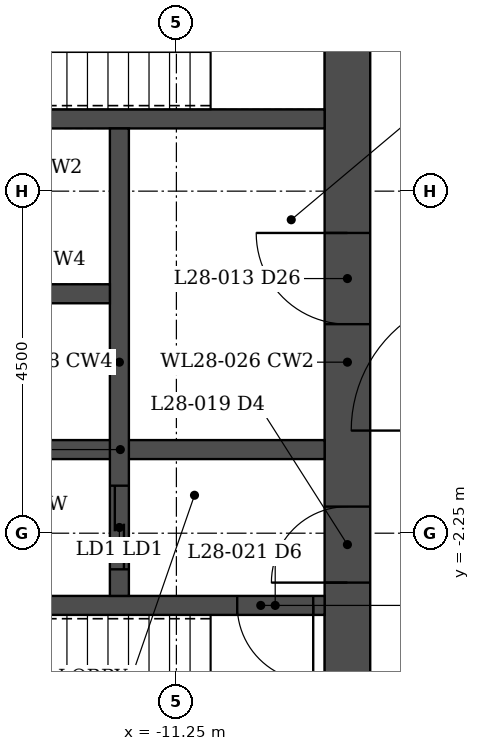
"""IFC4 building model, lengths in metres.
Left out: names, types, materials, properties, quantities, classifications, styles, units other than length and angle.
Written with IfcOpenShell. Run it as: python <this file> out.ifc"""

import sys

from ifc_helpers import new_model, si_unit, direction, frame, frame_2d, origin, place, context, subcontext, project, spatial, rectangle, extrude, element, fill, save


model = new_model("IFC4")
c1 = context("Model", 3, precision=1e-05, world=origin(), true_north=direction((0.0, 1.0)))
c2 = subcontext(c1, "Body", "Model", "MODEL_VIEW")
j1 = project(units=[si_unit("LENGTHUNIT", "METRE"), si_unit("PLANEANGLEUNIT", "RADIAN")], contexts=[c1])
p1 = place(None, origin())
s1 = spatial("IfcSite", under=j1, at=p1, CompositionType="ELEMENT")
p2 = place(p1, origin())
s2 = spatial("IfcBuilding", under=s1, at=p2, CompositionType="ELEMENT")
p3 = place(p2, frame((0.0, 0.0, 107.0)))
s3 = spatial("IfcBuildingStorey", under=s2, at=p3, CompositionType="ELEMENT", Elevation=107.0)
p4 = place(p3, frame((-9.0, -6.45, 0.0), z_axis=(0.0, 0.0, 1.0), x_axis=(0.0, 1.0, 0.0)))
e1 = element("IfcWall", 1, at=p4, inside=s3, PredefinedType="SHEAR", context=c2, shape_type="SweptSolid", body=[
    extrude(rectangle(XDim=12.9, YDim=0.6, at=frame_2d((6.45, 0.0))), origin(), (0.0, 0.0, 1.0), 5.4),
])
p5 = place(p4, frame((3.55, 0.0, 0.0)))
e2 = element("IfcOpeningElement", 2, at=p5, cuts=e1, PredefinedType="OPENING", context=c2, shape_type="SweptSolid", body=[
    extrude(rectangle(XDim=1.0, YDim=2.1, at=frame_2d((0.5, 1.05))), frame((0.0, 0.31, 0.0), z_axis=(0.0, -1.0, 0.0), x_axis=(1.0, 0.0, 0.0)), (0.0, 0.0, 1.0), 0.62),
])
p6 = place(p4, frame((6.95, 0.0, 0.0)))
e3 = element("IfcOpeningElement", 3, at=p6, cuts=e1, PredefinedType="OPENING", context=c2, shape_type="SweptSolid", body=[
    extrude(rectangle(XDim=1.2, YDim=2.1, at=frame_2d((0.6, 1.05))), frame((0.0, 0.31, 0.0), z_axis=(0.0, -1.0, 0.0), x_axis=(1.0, 0.0, 0.0)), (0.0, 0.0, 1.0), 0.62),
])
p7 = place(p4, frame((10.85, 0.0, 0.0)))
e4 = element("IfcOpeningElement", 4, at=p7, cuts=e1, PredefinedType="OPENING", context=c2, shape_type="SweptSolid", body=[
    extrude(rectangle(XDim=1.0, YDim=2.1, at=frame_2d((0.5, 1.05))), frame((0.0, 0.31, 0.0), z_axis=(0.0, -1.0, 0.0), x_axis=(1.0, 0.0, 0.0)), (0.0, 0.0, 1.0), 0.62),
])
p8 = place(p3, frame((-9.3, -3.2, 0.0), z_axis=(0.0, 0.0, 1.0), x_axis=(-1.0, 0.0, 0.0)))
e5 = element("IfcWall", 5, at=p8, inside=s3, PredefinedType="SHEAR", context=c2, shape_type="SweptSolid", body=[
    extrude(rectangle(XDim=8.4, YDim=0.25, at=frame_2d((4.2, 0.0))), origin(), (0.0, 0.0, 1.0), 5.4),
])
p9 = place(p8, frame((0.15, 0.0, 0.0)))
e6 = element("IfcOpeningElement", 6, at=p9, cuts=e5, PredefinedType="OPENING", context=c2, shape_type="SweptSolid", body=[
    extrude(rectangle(XDim=1.0, YDim=2.1, at=frame_2d((0.5, 1.05))), frame((0.0, 0.135, 0.0), z_axis=(0.0, -1.0, 0.0), x_axis=(1.0, 0.0, 0.0)), (0.0, 0.0, 1.0), 0.27),
])
p10 = place(p3, frame((-9.3, 3.2, 0.0), z_axis=(0.0, 0.0, 1.0), x_axis=(-1.0, 0.0, 0.0)))
e7 = element("IfcWall", 7, at=p10, inside=s3, PredefinedType="SHEAR", context=c2, shape_type="SweptSolid", body=[
    extrude(rectangle(XDim=8.4, YDim=0.25, at=frame_2d((4.2, 0.0))), origin(), (0.0, 0.0, 1.0), 5.4),
])
p11 = place(p3, frame((-9.3, -1.15, 0.0), z_axis=(0.0, 0.0, 1.0), x_axis=(-1.0, 0.0, 0.0)))
e8 = element("IfcWall", 8, at=p11, inside=s3, PredefinedType="SHEAR", context=c2, shape_type="SweptSolid", body=[
    extrude(rectangle(XDim=5.375, YDim=0.25, at=frame_2d((2.688, 0.0))), origin(), (0.0, 0.0, 1.0), 5.4),
])
p12 = place(p3, frame((-12.0, -3.075, 0.0), z_axis=(0.0, 0.0, 1.0), x_axis=(0.0, 1.0, 0.0)))
e9 = element("IfcWall", 9, at=p12, inside=s3, PredefinedType="SHEAR", context=c2, shape_type="SweptSolid", body=[
    extrude(rectangle(XDim=6.15, YDim=0.25, at=frame_2d((3.075, 0.0))), origin(), (0.0, 0.0, 1.0), 5.4),
])
p13 = place(p12, frame((0.35, 0.0, 0.0)))
e10 = element("IfcOpeningElement", 10, at=p13, cuts=e9, PredefinedType="OPENING", context=c2, shape_type="SweptSolid", body=[
    extrude(rectangle(XDim=1.1, YDim=2.1, at=frame_2d((0.55, 1.05))), frame((0.0, 0.135, 0.0), z_axis=(0.0, -1.0, 0.0), x_axis=(1.0, 0.0, 0.0)), (0.0, 0.0, 1.0), 0.27),
])
p14 = place(p3, frame((-12.125, 0.9, 0.0), z_axis=(0.0, 0.0, 1.0), x_axis=(-1.0, 0.0, 0.0)))
e11 = element("IfcWall", 11, at=p14, inside=s3, PredefinedType="SHEAR", context=c2, shape_type="SweptSolid", body=[
    extrude(rectangle(XDim=2.55, YDim=0.25, at=frame_2d((1.275, 0.0))), origin(), (0.0, 0.0, 1.0), 5.4),
])
p15 = place(p5, origin())
e12 = element("IfcDoor", 12, at=p15, inside=s3, OperationType="SINGLE_SWING_LEFT", PredefinedType="DOOR", context=c2, shape_type="SweptSolid", body=[
    extrude(rectangle(XDim=1.0, YDim=2.1, at=frame_2d((0.5, 1.05))), frame((0.0, 0.025, 0.0), z_axis=(0.0, -1.0, 0.0), x_axis=(1.0, 0.0, 0.0)), (0.0, 0.0, 1.0), 0.05),
])
fill(e2, e12)
p16 = place(p9, origin())
e13 = element("IfcDoor", 13, at=p16, inside=s3, OperationType="SINGLE_SWING_LEFT", PredefinedType="DOOR", context=c2, shape_type="SweptSolid", body=[
    extrude(rectangle(XDim=1.0, YDim=2.1, at=frame_2d((0.5, 1.05))), frame((0.0, 0.025, 0.0), z_axis=(0.0, -1.0, 0.0), x_axis=(1.0, 0.0, 0.0)), (0.0, 0.0, 1.0), 0.05),
])
fill(e6, e13)
p17 = place(p6, origin())
e14 = element("IfcDoor", 14, at=p17, inside=s3, OperationType="SINGLE_SWING_RIGHT", PredefinedType="DOOR", context=c2, shape_type="SweptSolid", body=[
    extrude(rectangle(XDim=1.2, YDim=2.1, at=frame_2d((0.6, 1.05))), frame((0.0, 0.025, 0.0), z_axis=(0.0, -1.0, 0.0), x_axis=(1.0, 0.0, 0.0)), (0.0, 0.0, 1.0), 0.05),
])
fill(e3, e14)
p18 = place(p13, origin())
e15 = element("IfcDoor", 15, at=p18, inside=s3, OperationType="DOUBLE_DOOR_SLIDING", PredefinedType="DOOR", context=c2, shape_type="SweptSolid", body=[
    extrude(rectangle(XDim=1.1, YDim=2.1, at=frame_2d((0.55, 1.05))), frame((0.0, 0.025, 0.0), z_axis=(0.0, -1.0, 0.0), x_axis=(1.0, 0.0, 0.0)), (0.0, 0.0, 1.0), 0.05),
])
fill(e10, e15)
save(model, sys.argv[1])
